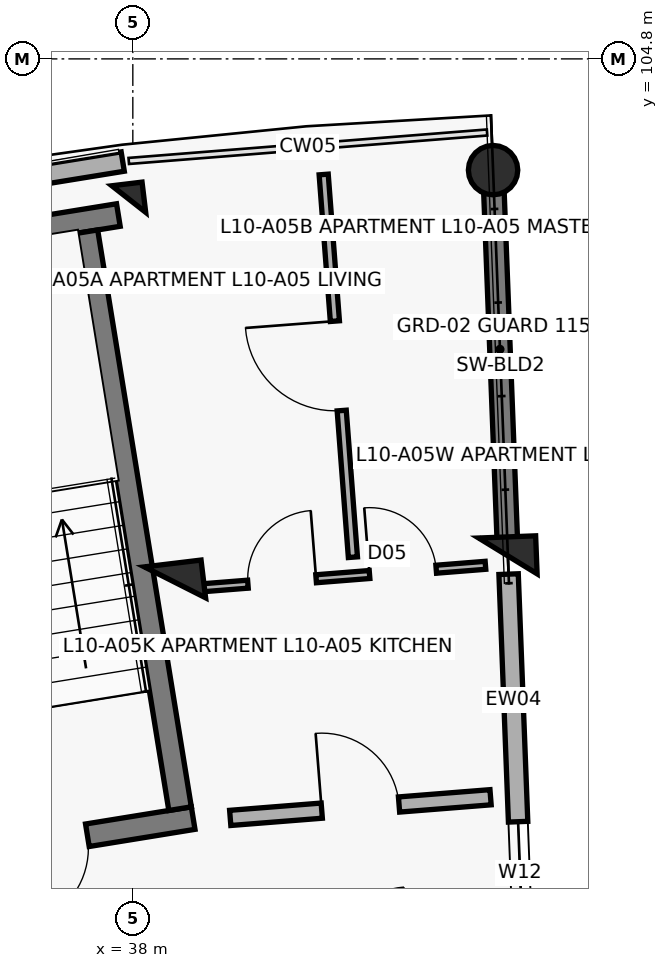
"""IFC4 building model, lengths in metres.
Left out: names, types, materials, properties, quantities, classifications, styles, units other than length and angle.
Written with IfcOpenShell. Run it as: python <this file> out.ifc"""

import sys

from ifc_helpers import new_model, si_unit, direction, frame, frame_2d, origin, origin_2d, place, context, subcontext, project, spatial, rectangle, circle, extrude, element, fill, save


model = new_model("IFC4")
c1 = context("Model", 3, precision=1e-05, world=origin(), true_north=direction((0.0, 1.0)))
c2 = subcontext(c1, "Body", "Model", "MODEL_VIEW")
j1 = project(units=[si_unit("LENGTHUNIT", "METRE"), si_unit("PLANEANGLEUNIT", "RADIAN")], contexts=[c1])
p1 = place(None, origin())
s1 = spatial("IfcSite", under=j1, at=p1, CompositionType="ELEMENT")
p2 = place(p1, origin())
s2 = spatial("IfcBuilding", under=s1, at=p2, CompositionType="ELEMENT")
p3 = place(p2, frame((0.0, 0.0, 32.9)))
s3 = spatial("IfcBuildingStorey", under=s2, at=p3, CompositionType="ELEMENT", Elevation=32.9)
p4 = place(p3, frame((38.555, 97.913, 0.0), z_axis=(0.0, 0.0, 1.0), x_axis=(-0.119790293837, 0.992799217114, 0.0)))
e1 = element("IfcColumn", 1, at=p4, inside=s3, PredefinedType="COLUMN", context=c2, shape_type="SweptSolid", body=[
    extrude(rectangle(XDim=0.5, YDim=0.75, at=origin_2d()), origin(), (0.0, 0.0, 1.0), 3.1),
])
p5 = place(p3, frame((37.947, 102.956, 0.0), z_axis=(0.0, 0.0, 1.0), x_axis=(-0.119790293837, 0.992799217114, 0.0)))
e2 = element("IfcColumn", 2, at=p5, inside=s3, PredefinedType="COLUMN", context=c2, shape_type="SweptSolid", body=[
    extrude(rectangle(XDim=0.4, YDim=0.4, at=origin_2d()), origin(), (0.0, 0.0, 1.0), 3.1),
])
p6 = place(p3, frame((42.935, 98.26, 0.0), z_axis=(0.0, 0.0, 1.0), x_axis=(-0.038387809088, 0.999262916411, 0.0)))
e3 = element("IfcColumn", 3, at=p6, inside=s3, PredefinedType="COLUMN", context=c2, shape_type="SweptSolid", body=[
    extrude(rectangle(XDim=0.5, YDim=0.75, at=origin_2d()), origin(), (0.0, 0.0, 1.0), 3.1),
])
p7 = place(p3, frame((42.74, 103.337, 0.0), z_axis=(0.0, 0.0, 1.0), x_axis=(-0.038387809088, 0.999262916411, 0.0)))
e4 = element("IfcColumn", 4, at=p7, inside=s3, PredefinedType="COLUMN", context=c2, shape_type="SweptSolid", body=[
    extrude(circle(Radius=0.325, at=origin_2d()), origin(), (0.0, 0.0, 1.0), 3.1),
])
p8 = place(p3, frame((42.928, 98.44, 0.0), z_axis=(0.0, 0.0, 1.0), x_axis=(-0.038379487611, 0.999263236055, 0.0)))
e5 = element("IfcWall", 5, at=p8, inside=s3, PredefinedType="SHEAR", context=c2, shape_type="SweptSolid", body=[
    extrude(rectangle(XDim=4.72, YDim=0.27, at=frame_2d((2.36, 0.0))), origin(), (0.0, 0.0, 1.0), 2.86),
])
p9 = place(p3, frame((33.12, 102.679, 0.0), z_axis=(0.0, 0.0, 1.0), x_axis=(0.987080750493, 0.160223568819, 0.0)))
e6 = element("IfcWall", 6, at=p9, inside=s3, PredefinedType="SOLIDWALL", context=c2, shape_type="SweptSolid", body=[
    extrude(rectangle(XDim=4.809, YDim=0.258, at=frame_2d((2.404, 0.0))), origin(), (0.0, 0.0, 1.0), 2.25),
])
p10 = place(p3, frame((43.259, 89.827, 0.0), z_axis=(0.0, 0.0, 1.0), x_axis=(-0.038407966241, 0.999262141847, 0.0)))
e7 = element("IfcWall", 7, at=p10, inside=s3, PredefinedType="SOLIDWALL", context=c2, shape_type="SweptSolid", body=[
    extrude(rectangle(XDim=8.2, YDim=0.255, at=frame_2d((4.1, 0.0))), origin(), (0.0, 0.0, 1.0), 2.18),
])
p11 = place(p10, frame((3.59, 0.0, 0.75)))
e8 = element("IfcOpeningElement", 8, at=p11, cuts=e7, PredefinedType="OPENING", context=c2, shape_type="SweptSolid", body=[
    extrude(rectangle(XDim=1.35, YDim=1.35, at=frame_2d((0.675, 0.675))), frame((0.0, 0.137, 0.0), z_axis=(0.0, -1.0, 0.0), x_axis=(1.0, 0.0, 0.0)), (0.0, 0.0, 1.0), 0.275),
])
p12 = place(p3, frame((38.794, 94.811, 0.0), z_axis=(0.0, 0.0, 1.0), x_axis=(-0.987077443397, -0.160243941341, 0.0)))
e9 = element("IfcWall", 9, at=p12, inside=s3, PredefinedType="SHEAR", context=c2, shape_type="SweptSolid", body=[
    extrude(rectangle(XDim=3.87, YDim=0.3, at=frame_2d((1.935, 0.0))), origin(), (0.0, 0.0, 1.0), 3.1),
])
p13 = place(p12, frame((1.41, 0.0, 0.0)))
e10 = element("IfcOpeningElement", 10, at=p13, cuts=e9, PredefinedType="OPENING", context=c2, shape_type="SweptSolid", body=[
    extrude(rectangle(XDim=1.05, YDim=2.15, at=frame_2d((0.525, 1.075))), frame((0.0, 0.16, 0.0), z_axis=(0.0, -1.0, 0.0), x_axis=(1.0, 0.0, 0.0)), (0.0, 0.0, 1.0), 0.32),
])
p14 = place(p3, frame((37.81, 102.745, 0.0), z_axis=(0.0, 0.0, 1.0), x_axis=(-0.987084710126, -0.160199173019, 0.0)))
e11 = element("IfcWall", 11, at=p14, inside=s3, PredefinedType="SHEAR", context=c2, shape_type="SweptSolid", body=[
    extrude(rectangle(XDim=4.47, YDim=0.3, at=frame_2d((2.235, 0.0))), origin(), (0.0, 0.0, 1.0), 3.1),
])
p15 = place(p3, frame((38.622, 94.935, 0.0), z_axis=(0.0, 0.0, 1.0), x_axis=(-0.160196564502, 0.987085133472, 0.0)))
e12 = element("IfcWall", 12, at=p15, inside=s3, PredefinedType="SHEAR", context=c2, shape_type="SweptSolid", body=[
    extrude(rectangle(XDim=7.69, YDim=0.3, at=frame_2d((3.845, 0.0))), origin(), (0.0, 0.0, 1.0), 3.1),
])
p16 = place(p3, frame((39.281, 94.813, 0.0), z_axis=(0.0, 0.0, 1.0), x_axis=(0.996862545573, 0.079152165058, 0.0)))
e13 = element("IfcWall", 13, at=p16, inside=s3, PredefinedType="SOLIDWALL", context=c2, shape_type="SweptSolid", body=[
    extrude(rectangle(XDim=3.436, YDim=0.2, at=frame_2d((1.718, 0.0))), origin(), (0.0, 0.0, 1.0), 2.08),
])
p17 = place(p16, frame((1.208, 0.0, 0.0)))
e14 = element("IfcOpeningElement", 14, at=p17, cuts=e13, PredefinedType="OPENING", context=c2, shape_type="SweptSolid", body=[
    extrude(rectangle(XDim=1.02, YDim=2.15, at=frame_2d((0.51, 1.075))), frame((0.0, 0.11, 0.0), z_axis=(0.0, -1.0, 0.0), x_axis=(1.0, 0.0, 0.0)), (0.0, 0.0, 1.0), 0.22),
])
p18 = place(p3, frame((38.866, 97.837, 0.0), z_axis=(0.0, 0.0, 1.0), x_axis=(0.996863292793, 0.079142753818, 0.0)))
e15 = element("IfcWall", 15, at=p18, inside=s3, PredefinedType="PARTITIONING", context=c2, shape_type="SweptSolid", body=[
    extrude(rectangle(XDim=3.785, YDim=0.105, at=frame_2d((1.893, 0.0))), origin(), (0.0, 0.0, 1.0), 2.08),
])
p19 = place(p18, frame((0.65, 0.0, 0.0)))
e16 = element("IfcOpeningElement", 16, at=p19, cuts=e15, PredefinedType="OPENING", context=c2, shape_type="SweptSolid", body=[
    extrude(rectangle(XDim=0.9, YDim=2.1, at=frame_2d((0.45, 1.05))), frame((0.0, 0.062, 0.0), z_axis=(0.0, -1.0, 0.0), x_axis=(1.0, 0.0, 0.0)), (0.0, 0.0, 1.0), 0.125),
])
p20 = place(p18, frame((2.255, 0.0, 0.0)))
e17 = element("IfcOpeningElement", 17, at=p20, cuts=e15, PredefinedType="OPENING", context=c2, shape_type="SweptSolid", body=[
    extrude(rectangle(XDim=0.88, YDim=2.1, at=frame_2d((0.44, 1.05))), frame((0.0, 0.062, 0.0), z_axis=(0.0, -1.0, 0.0), x_axis=(1.0, 0.0, 0.0)), (0.0, 0.0, 1.0), 0.125),
])
p21 = place(p3, frame((40.896, 98.243, 0.0), z_axis=(0.0, 0.0, 1.0), x_axis=(-0.076141951799, 0.997096987848, 0.0)))
e18 = element("IfcWall", 18, at=p21, inside=s3, PredefinedType="PARTITIONING", context=c2, shape_type="SweptSolid", body=[
    extrude(rectangle(XDim=5.05, YDim=0.12, at=frame_2d((2.525, 0.0))), origin(), (0.0, 0.0, 1.0), 2.08),
])
p22 = place(p21, frame((1.935, 0.0, 0.0)))
e19 = element("IfcOpeningElement", 19, at=p22, cuts=e18, PredefinedType="OPENING", context=c2, shape_type="SweptSolid", body=[
    extrude(rectangle(XDim=1.18, YDim=2.1, at=frame_2d((0.59, 1.05))), frame((0.0, 0.07, 0.0), z_axis=(0.0, -1.0, 0.0), x_axis=(1.0, 0.0, 0.0)), (0.0, 0.0, 1.0), 0.14),
])
p23 = place(p11, origin())
e20 = element("IfcWindow", 20, at=p23, inside=s3, PartitioningType="DOUBLE_PANEL_VERTICAL", PredefinedType="WINDOW", context=c2, shape_type="SweptSolid", body=[
    extrude(rectangle(XDim=1.35, YDim=1.35, at=frame_2d((0.675, 0.675))), frame((0.0, 0.03, 0.0), z_axis=(0.0, -1.0, 0.0), x_axis=(1.0, 0.0, 0.0)), (0.0, 0.0, 1.0), 0.06),
])
fill(e8, e20)
p24 = place(p13, origin())
e21 = element("IfcDoor", 21, at=p24, inside=s3, OperationType="SINGLE_SWING_RIGHT", PredefinedType="DOOR", context=c2, shape_type="SweptSolid", body=[
    extrude(rectangle(XDim=1.05, YDim=2.15, at=frame_2d((0.525, 1.075))), frame((0.0, 0.025, 0.0), z_axis=(0.0, -1.0, 0.0), x_axis=(1.0, 0.0, 0.0)), (0.0, 0.0, 1.0), 0.05),
])
fill(e10, e21)
p25 = place(p17, origin())
e22 = element("IfcDoor", 22, at=p25, inside=s3, OperationType="SINGLE_SWING_LEFT", PredefinedType="DOOR", context=c2, shape_type="SweptSolid", body=[
    extrude(rectangle(XDim=1.02, YDim=2.15, at=frame_2d((0.51, 1.075))), frame((0.0, 0.025, 0.0), z_axis=(0.0, -1.0, 0.0), x_axis=(1.0, 0.0, 0.0)), (0.0, 0.0, 1.0), 0.05),
])
fill(e14, e22)
p26 = place(p19, origin())
e23 = element("IfcDoor", 23, at=p26, inside=s3, OperationType="SINGLE_SWING_RIGHT", PredefinedType="DOOR", context=c2, shape_type="SweptSolid", body=[
    extrude(rectangle(XDim=0.9, YDim=2.1, at=frame_2d((0.45, 1.05))), frame((0.0, 0.025, 0.0), z_axis=(0.0, -1.0, 0.0), x_axis=(1.0, 0.0, 0.0)), (0.0, 0.0, 1.0), 0.05),
])
fill(e16, e23)
p27 = place(p20, origin())
e24 = element("IfcDoor", 24, at=p27, inside=s3, OperationType="SINGLE_SWING_LEFT", PredefinedType="DOOR", context=c2, shape_type="SweptSolid", body=[
    extrude(rectangle(XDim=0.88, YDim=2.1, at=frame_2d((0.44, 1.05))), frame((0.0, 0.025, 0.0), z_axis=(0.0, -1.0, 0.0), x_axis=(1.0, 0.0, 0.0)), (0.0, 0.0, 1.0), 0.05),
])
fill(e17, e24)
p28 = place(p22, origin())
e25 = element("IfcDoor", 25, at=p28, inside=s3, OperationType="SINGLE_SWING_RIGHT", PredefinedType="DOOR", context=c2, shape_type="SweptSolid", body=[
    extrude(rectangle(XDim=1.18, YDim=2.1, at=frame_2d((0.59, 1.05))), frame((0.0, 0.025, 0.0), z_axis=(0.0, -1.0, 0.0), x_axis=(1.0, 0.0, 0.0)), (0.0, 0.0, 1.0), 0.05),
])
fill(e19, e25)
save(model, sys.argv[1])
